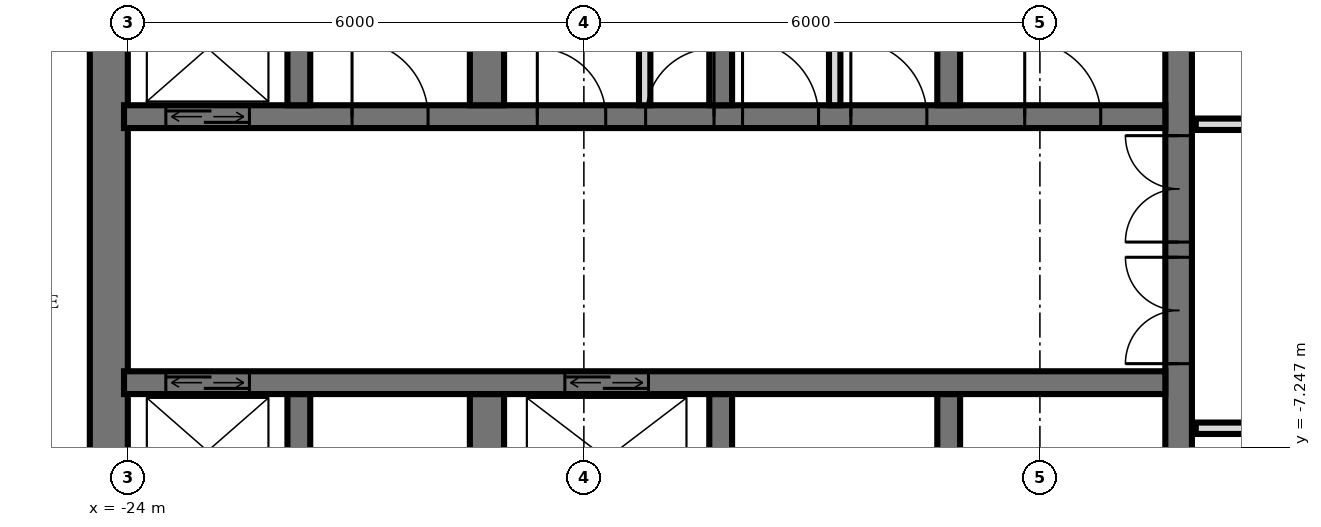
"""IFC4 building model, lengths in metres.
Left out: names, types, materials, properties, quantities, classifications, styles, units other than length and angle.
Written with IfcOpenShell. Run it as: python <this file> out.ifc"""

import sys

from ifc_helpers import new_model, si_unit, direction, frame, frame_2d, origin, place, context, subcontext, project, spatial, rectangle, extrude, element, fill, save


model = new_model("IFC4")
c1 = context("Model", 3, precision=1e-05, world=origin(), true_north=direction((0.0, 1.0)))
c2 = subcontext(c1, "Body", "Model", "MODEL_VIEW")
j1 = project(units=[si_unit("LENGTHUNIT", "METRE"), si_unit("PLANEANGLEUNIT", "RADIAN")], contexts=[c1])
p1 = place(None, origin())
s1 = spatial("IfcSite", under=j1, at=p1, CompositionType="ELEMENT")
p2 = place(p1, origin())
s2 = spatial("IfcBuilding", under=s1, at=p2, CompositionType="ELEMENT")
p3 = place(p2, frame((0.0, 0.0, 127.2)))
s3 = spatial("IfcBuildingStorey", under=s2, at=p3, CompositionType="ELEMENT", Elevation=127.2)
p4 = place(p3, frame((-10.175, -14.55, 0.0), z_axis=(0.0, 0.0, 1.0), x_axis=(0.0, 1.0, 0.0)))
e1 = element("IfcWall", 1, at=p4, inside=s3, PredefinedType="SHEAR", context=c2, shape_type="SweptSolid", body=[
    extrude(rectangle(XDim=14.1, YDim=0.35, at=frame_2d((7.05, 0.0))), origin(), (0.0, 0.0, 1.0), 3.6),
])
p5 = place(p4, frame((8.4, 0.0, 0.0)))
e2 = element("IfcOpeningElement", 2, at=p5, cuts=e1, PredefinedType="OPENING", context=c2, shape_type="SweptSolid", body=[
    extrude(rectangle(XDim=1.4, YDim=2.4, at=frame_2d((0.7, 1.2))), frame((0.0, 0.185, 0.0), z_axis=(0.0, -1.0, 0.0), x_axis=(1.0, 0.0, 0.0)), (0.0, 0.0, 1.0), 0.37),
])
p6 = place(p4, frame((10.0, 0.0, 0.0)))
e3 = element("IfcOpeningElement", 3, at=p6, cuts=e1, PredefinedType="OPENING", context=c2, shape_type="SweptSolid", body=[
    extrude(rectangle(XDim=1.4, YDim=2.4, at=frame_2d((0.7, 1.2))), frame((0.0, 0.185, 0.0), z_axis=(0.0, -1.0, 0.0), x_axis=(1.0, 0.0, 0.0)), (0.0, 0.0, 1.0), 0.37),
])
p7 = place(p4, frame((4.0, 0.0, 0.0)))
e4 = element("IfcOpeningElement", 4, at=p7, cuts=e1, PredefinedType="OPENING", context=c2, shape_type="SweptSolid", body=[
    extrude(rectangle(XDim=1.2, YDim=2.1, at=frame_2d((0.6, 1.05))), frame((0.0, 0.185, 0.0), z_axis=(0.0, -1.0, 0.0), x_axis=(1.0, 0.0, 0.0)), (0.0, 0.0, 1.0), 0.37),
])
p8 = place(p3, frame((-24.25, -14.55, 0.0), z_axis=(0.0, 0.0, 1.0), x_axis=(0.0, 1.0, 0.0)))
e5 = element("IfcWall", 5, at=p8, inside=s3, PredefinedType="SHEAR", context=c2, shape_type="SweptSolid", body=[
    extrude(rectangle(XDim=14.1, YDim=0.5, at=frame_2d((7.05, 0.0))), origin(), (0.0, 0.0, 1.0), 3.6),
])
p9 = place(p3, frame((-24.05, -2.9, 0.0), z_axis=(0.0, 0.0, 1.0), x_axis=(1.0, 0.0, 0.0)))
e6 = element("IfcWall", 6, at=p9, inside=s3, PredefinedType="SHEAR", context=c2, shape_type="SweptSolid", body=[
    extrude(rectangle(XDim=13.7, YDim=0.3, at=frame_2d((6.85, 0.0))), origin(), (0.0, 0.0, 1.0), 3.6),
])
p10 = place(p9, frame((0.55, 0.0, 0.0)))
e7 = element("IfcOpeningElement", 7, at=p10, cuts=e6, PredefinedType="OPENING", context=c2, shape_type="SweptSolid", body=[
    extrude(rectangle(XDim=1.1, YDim=2.1, at=frame_2d((0.55, 1.05))), frame((0.0, 0.16, 0.0), z_axis=(0.0, -1.0, 0.0), x_axis=(1.0, 0.0, 0.0)), (0.0, 0.0, 1.0), 0.32),
])
p11 = place(p9, frame((6.863, 0.0, 0.0)))
e8 = element("IfcOpeningElement", 8, at=p11, cuts=e6, PredefinedType="OPENING", context=c2, shape_type="SweptSolid", body=[
    extrude(rectangle(XDim=0.9, YDim=2.1, at=frame_2d((0.45, 1.05))), frame((0.0, 0.16, 0.0), z_axis=(0.0, -1.0, 0.0), x_axis=(1.0, 0.0, 0.0)), (0.0, 0.0, 1.0), 0.32),
])
p12 = place(p9, frame((5.438, 0.0, 0.0)))
e9 = element("IfcOpeningElement", 9, at=p12, cuts=e6, PredefinedType="OPENING", context=c2, shape_type="SweptSolid", body=[
    extrude(rectangle(XDim=0.9, YDim=2.1, at=frame_2d((0.45, 1.05))), frame((0.0, 0.16, 0.0), z_axis=(0.0, -1.0, 0.0), x_axis=(1.0, 0.0, 0.0)), (0.0, 0.0, 1.0), 0.32),
])
p13 = place(p9, frame((11.85, 0.0, 0.0)))
e10 = element("IfcOpeningElement", 10, at=p13, cuts=e6, PredefinedType="OPENING", context=c2, shape_type="SweptSolid", body=[
    extrude(rectangle(XDim=1.0, YDim=2.1, at=frame_2d((0.5, 1.05))), frame((0.0, 0.16, 0.0), z_axis=(0.0, -1.0, 0.0), x_axis=(1.0, 0.0, 0.0)), (0.0, 0.0, 1.0), 0.32),
])
p14 = place(p9, frame((9.562, 0.0, 0.0)))
e11 = element("IfcOpeningElement", 11, at=p14, cuts=e6, PredefinedType="OPENING", context=c2, shape_type="SweptSolid", body=[
    extrude(rectangle(XDim=1.0, YDim=2.1, at=frame_2d((0.5, 1.05))), frame((0.0, 0.16, 0.0), z_axis=(0.0, -1.0, 0.0), x_axis=(1.0, 0.0, 0.0)), (0.0, 0.0, 1.0), 0.32),
])
p15 = place(p9, frame((8.137, 0.0, 0.0)))
e12 = element("IfcOpeningElement", 12, at=p15, cuts=e6, PredefinedType="OPENING", context=c2, shape_type="SweptSolid", body=[
    extrude(rectangle(XDim=1.0, YDim=2.1, at=frame_2d((0.5, 1.05))), frame((0.0, 0.16, 0.0), z_axis=(0.0, -1.0, 0.0), x_axis=(1.0, 0.0, 0.0)), (0.0, 0.0, 1.0), 0.32),
])
p16 = place(p9, frame((3.0, 0.0, 0.0)))
e13 = element("IfcOpeningElement", 13, at=p16, cuts=e6, PredefinedType="OPENING", context=c2, shape_type="SweptSolid", body=[
    extrude(rectangle(XDim=1.0, YDim=2.1, at=frame_2d((0.5, 1.05))), frame((0.0, 0.16, 0.0), z_axis=(0.0, -1.0, 0.0), x_axis=(1.0, 0.0, 0.0)), (0.0, 0.0, 1.0), 0.32),
])
p17 = place(p3, frame((-24.05, -6.4, 0.0), z_axis=(0.0, 0.0, 1.0), x_axis=(1.0, 0.0, 0.0)))
e14 = element("IfcWall", 14, at=p17, inside=s3, PredefinedType="SHEAR", context=c2, shape_type="SweptSolid", body=[
    extrude(rectangle(XDim=13.7, YDim=0.3, at=frame_2d((6.85, 0.0))), origin(), (0.0, 0.0, 1.0), 3.6),
])
p18 = place(p17, frame((0.55, 0.0, 0.0)))
e15 = element("IfcOpeningElement", 15, at=p18, cuts=e14, PredefinedType="OPENING", context=c2, shape_type="SweptSolid", body=[
    extrude(rectangle(XDim=1.1, YDim=2.1, at=frame_2d((0.55, 1.05))), frame((0.0, 0.16, 0.0), z_axis=(0.0, -1.0, 0.0), x_axis=(1.0, 0.0, 0.0)), (0.0, 0.0, 1.0), 0.32),
])
p19 = place(p17, frame((5.8, 0.0, 0.0)))
e16 = element("IfcOpeningElement", 16, at=p19, cuts=e14, PredefinedType="OPENING", context=c2, shape_type="SweptSolid", body=[
    extrude(rectangle(XDim=1.1, YDim=2.1, at=frame_2d((0.55, 1.05))), frame((0.0, 0.16, 0.0), z_axis=(0.0, -1.0, 0.0), x_axis=(1.0, 0.0, 0.0)), (0.0, 0.0, 1.0), 0.32),
])
for number, where, z_axis, x_axis in (
    (17, (-13.2, -2.75, 0.0), (0.0, 0.0, 1.0), (0.0, 1.0, 0.0)),
    (18, (-13.2, -8.85, 0.0), (0.0, 0.0, 1.0), (0.0, 1.0, 0.0)),
    (19, (-16.2, -2.75, 0.0), (0.0, 0.0, 1.0), (0.0, 1.0, 0.0)),
    (20, (-16.2, -8.85, 0.0), (0.0, 0.0, 1.0), (0.0, 1.0, 0.0)),
):
    element("IfcWall", number, at=place(p3, frame(where, z_axis=z_axis, x_axis=x_axis)), inside=s3, PredefinedType="SHEAR", context=c2, shape_type="SweptSolid", body=[
        extrude(rectangle(XDim=2.3, YDim=0.3, at=frame_2d((1.15, 0.0))), origin(), (0.0, 0.0, 1.0), 3.6),
    ])
for number, where, z_axis, x_axis in (
    (21, (-19.275, -2.75, 0.0), (0.0, 0.0, 1.0), (0.0, 1.0, 0.0)),
    (22, (-19.275, -8.85, 0.0), (0.0, 0.0, 1.0), (0.0, 1.0, 0.0)),
):
    element("IfcWall", number, at=place(p3, frame(where, z_axis=z_axis, x_axis=x_axis)), inside=s3, PredefinedType="SHEAR", context=c2, shape_type="SweptSolid", body=[
        extrude(rectangle(XDim=2.3, YDim=0.45, at=frame_2d((1.15, 0.0))), origin(), (0.0, 0.0, 1.0), 3.6),
    ])
for number, where, z_axis, x_axis in (
    (23, (-21.75, -2.75, 0.0), (0.0, 0.0, 1.0), (0.0, 1.0, 0.0)),
    (24, (-21.75, -8.85, 0.0), (0.0, 0.0, 1.0), (0.0, 1.0, 0.0)),
):
    element("IfcWall", number, at=place(p3, frame(where, z_axis=z_axis, x_axis=x_axis)), inside=s3, PredefinedType="SHEAR", context=c2, shape_type="SweptSolid", body=[
        extrude(rectangle(XDim=2.3, YDim=0.3, at=frame_2d((1.15, 0.0))), origin(), (0.0, 0.0, 1.0), 3.6),
    ])
for number, where, z_axis, x_axis in (
    (25, (-17.2, -2.75, 0.0), (0.0, 0.0, 1.0), (0.0, 1.0, 0.0)),
    (26, (-14.7, -2.75, 0.0), (0.0, 0.0, 1.0), (0.0, 1.0, 0.0)),
):
    element("IfcWall", number, at=place(p3, frame(where, z_axis=z_axis, x_axis=x_axis)), inside=s3, PredefinedType="PARTITIONING", context=c2, shape_type="SweptSolid", body=[
        extrude(rectangle(XDim=2.3, YDim=0.15, at=frame_2d((1.15, 0.0))), origin(), (0.0, 0.0, 1.0), 3.3),
    ])
p20 = place(p3, frame((-9.95, -7.0, 0.0), z_axis=(0.0, 0.0, 1.0), x_axis=(1.0, 0.0, 0.0)))
e27 = element("IfcWall", 27, at=p20, inside=s3, PredefinedType="PARTITIONING", context=c2, shape_type="SweptSolid", body=[
    extrude(rectangle(XDim=19.9, YDim=0.15, at=frame_2d((9.95, 0.0))), origin(), (0.0, 0.0, 1.0), 3.32),
])
p21 = place(p20, frame((9.45, 0.0, 0.0)))
e28 = element("IfcOpeningElement", 28, at=p21, cuts=e27, PredefinedType="OPENING", context=c2, shape_type="SweptSolid", body=[
    extrude(rectangle(XDim=1.0, YDim=2.1, at=frame_2d((0.5, 1.05))), frame((0.0, 0.085, 0.0), z_axis=(0.0, -1.0, 0.0), x_axis=(1.0, 0.0, 0.0)), (0.0, 0.0, 1.0), 0.17),
])
p22 = place(p20, frame((15.45, 0.0, 0.0)))
e29 = element("IfcOpeningElement", 29, at=p22, cuts=e27, PredefinedType="OPENING", context=c2, shape_type="SweptSolid", body=[
    extrude(rectangle(XDim=1.0, YDim=2.1, at=frame_2d((0.5, 1.05))), frame((0.0, 0.085, 0.0), z_axis=(0.0, -1.0, 0.0), x_axis=(1.0, 0.0, 0.0)), (0.0, 0.0, 1.0), 0.17),
])
p23 = place(p3, frame((-9.95, -3.0, 0.0), z_axis=(0.0, 0.0, 1.0), x_axis=(1.0, 0.0, 0.0)))
e30 = element("IfcWall", 30, at=p23, inside=s3, PredefinedType="PARTITIONING", context=c2, shape_type="SweptSolid", body=[
    extrude(rectangle(XDim=19.9, YDim=0.15, at=frame_2d((9.95, 0.0))), origin(), (0.0, 0.0, 1.0), 3.32),
])
p24 = place(p23, frame((1.7, 0.0, 0.0)))
e31 = element("IfcOpeningElement", 31, at=p24, cuts=e30, PredefinedType="OPENING", context=c2, shape_type="SweptSolid", body=[
    extrude(rectangle(XDim=1.0, YDim=2.1, at=frame_2d((0.5, 1.05))), frame((0.0, 0.085, 0.0), z_axis=(0.0, -1.0, 0.0), x_axis=(1.0, 0.0, 0.0)), (0.0, 0.0, 1.0), 0.17),
])
p25 = place(p23, frame((5.45, 0.0, 0.0)))
e32 = element("IfcOpeningElement", 32, at=p25, cuts=e30, PredefinedType="OPENING", context=c2, shape_type="SweptSolid", body=[
    extrude(rectangle(XDim=1.0, YDim=2.1, at=frame_2d((0.5, 1.05))), frame((0.0, 0.085, 0.0), z_axis=(0.0, -1.0, 0.0), x_axis=(1.0, 0.0, 0.0)), (0.0, 0.0, 1.0), 0.17),
])
p26 = place(p23, frame((8.2, 0.0, 0.0)))
e33 = element("IfcOpeningElement", 33, at=p26, cuts=e30, PredefinedType="OPENING", context=c2, shape_type="SweptSolid", body=[
    extrude(rectangle(XDim=1.0, YDim=2.1, at=frame_2d((0.5, 1.05))), frame((0.0, 0.085, 0.0), z_axis=(0.0, -1.0, 0.0), x_axis=(1.0, 0.0, 0.0)), (0.0, 0.0, 1.0), 0.17),
])
p27 = place(p23, frame((11.95, 0.0, 0.0)))
e34 = element("IfcOpeningElement", 34, at=p27, cuts=e30, PredefinedType="OPENING", context=c2, shape_type="SweptSolid", body=[
    extrude(rectangle(XDim=1.0, YDim=2.1, at=frame_2d((0.5, 1.05))), frame((0.0, 0.085, 0.0), z_axis=(0.0, -1.0, 0.0), x_axis=(1.0, 0.0, 0.0)), (0.0, 0.0, 1.0), 0.17),
])
p28 = place(p23, frame((16.95, 0.0, 0.0)))
e35 = element("IfcOpeningElement", 35, at=p28, cuts=e30, PredefinedType="OPENING", context=c2, shape_type="SweptSolid", body=[
    extrude(rectangle(XDim=1.0, YDim=2.1, at=frame_2d((0.5, 1.05))), frame((0.0, 0.085, 0.0), z_axis=(0.0, -1.0, 0.0), x_axis=(1.0, 0.0, 0.0)), (0.0, 0.0, 1.0), 0.17),
])
p29 = place(p10, origin())
e36 = element("IfcDoor", 36, at=p29, inside=s3, OperationType="DOUBLE_DOOR_SLIDING", PredefinedType="USERDEFINED", context=c2, shape_type="SweptSolid", body=[
    extrude(rectangle(XDim=1.1, YDim=2.1, at=frame_2d((0.55, 1.05))), frame((0.0, 0.025, 0.0), z_axis=(0.0, -1.0, 0.0), x_axis=(1.0, 0.0, 0.0)), (0.0, 0.0, 1.0), 0.05),
])
fill(e7, e36)
p30 = place(p18, origin())
e37 = element("IfcDoor", 37, at=p30, inside=s3, OperationType="DOUBLE_DOOR_SLIDING", PredefinedType="USERDEFINED", context=c2, shape_type="SweptSolid", body=[
    extrude(rectangle(XDim=1.1, YDim=2.1, at=frame_2d((0.55, 1.05))), frame((0.0, 0.025, 0.0), z_axis=(0.0, -1.0, 0.0), x_axis=(1.0, 0.0, 0.0)), (0.0, 0.0, 1.0), 0.05),
])
fill(e15, e37)
p31 = place(p19, origin())
e38 = element("IfcDoor", 38, at=p31, inside=s3, OperationType="DOUBLE_DOOR_SLIDING", PredefinedType="USERDEFINED", context=c2, shape_type="SweptSolid", body=[
    extrude(rectangle(XDim=1.1, YDim=2.1, at=frame_2d((0.55, 1.05))), frame((0.0, 0.025, 0.0), z_axis=(0.0, -1.0, 0.0), x_axis=(1.0, 0.0, 0.0)), (0.0, 0.0, 1.0), 0.05),
])
fill(e16, e38)
p32 = place(p5, origin())
e39 = element("IfcDoor", 39, at=p32, inside=s3, OperationType="DOUBLE_DOOR_SINGLE_SWING", PredefinedType="DOOR", context=c2, shape_type="SweptSolid", body=[
    extrude(rectangle(XDim=1.4, YDim=2.4, at=frame_2d((0.7, 1.2))), frame((0.0, 0.025, 0.0), z_axis=(0.0, -1.0, 0.0), x_axis=(1.0, 0.0, 0.0)), (0.0, 0.0, 1.0), 0.05),
])
fill(e2, e39)
p33 = place(p6, origin())
e40 = element("IfcDoor", 40, at=p33, inside=s3, OperationType="DOUBLE_DOOR_SINGLE_SWING", PredefinedType="DOOR", context=c2, shape_type="SweptSolid", body=[
    extrude(rectangle(XDim=1.4, YDim=2.4, at=frame_2d((0.7, 1.2))), frame((0.0, 0.025, 0.0), z_axis=(0.0, -1.0, 0.0), x_axis=(1.0, 0.0, 0.0)), (0.0, 0.0, 1.0), 0.05),
])
fill(e3, e40)
p34 = place(p11, origin())
e41 = element("IfcDoor", 41, at=p34, inside=s3, OperationType="SINGLE_SWING_LEFT", PredefinedType="DOOR", context=c2, shape_type="SweptSolid", body=[
    extrude(rectangle(XDim=0.9, YDim=2.1, at=frame_2d((0.45, 1.05))), frame((0.0, 0.025, 0.0), z_axis=(0.0, -1.0, 0.0), x_axis=(1.0, 0.0, 0.0)), (0.0, 0.0, 1.0), 0.05),
])
fill(e8, e41)
p35 = place(p12, origin())
e42 = element("IfcDoor", 42, at=p35, inside=s3, OperationType="SINGLE_SWING_RIGHT", PredefinedType="DOOR", context=c2, shape_type="SweptSolid", body=[
    extrude(rectangle(XDim=0.9, YDim=2.1, at=frame_2d((0.45, 1.05))), frame((0.0, 0.025, 0.0), z_axis=(0.0, -1.0, 0.0), x_axis=(1.0, 0.0, 0.0)), (0.0, 0.0, 1.0), 0.05),
])
fill(e9, e42)
p36 = place(p13, origin())
e43 = element("IfcDoor", 43, at=p36, inside=s3, OperationType="SINGLE_SWING_RIGHT", PredefinedType="DOOR", context=c2, shape_type="SweptSolid", body=[
    extrude(rectangle(XDim=1.0, YDim=2.1, at=frame_2d((0.5, 1.05))), frame((0.0, 0.025, 0.0), z_axis=(0.0, -1.0, 0.0), x_axis=(1.0, 0.0, 0.0)), (0.0, 0.0, 1.0), 0.05),
])
fill(e10, e43)
p37 = place(p14, origin())
e44 = element("IfcDoor", 44, at=p37, inside=s3, OperationType="SINGLE_SWING_RIGHT", PredefinedType="DOOR", context=c2, shape_type="SweptSolid", body=[
    extrude(rectangle(XDim=1.0, YDim=2.1, at=frame_2d((0.5, 1.05))), frame((0.0, 0.025, 0.0), z_axis=(0.0, -1.0, 0.0), x_axis=(1.0, 0.0, 0.0)), (0.0, 0.0, 1.0), 0.05),
])
fill(e11, e44)
p38 = place(p15, origin())
e45 = element("IfcDoor", 45, at=p38, inside=s3, OperationType="SINGLE_SWING_RIGHT", PredefinedType="DOOR", context=c2, shape_type="SweptSolid", body=[
    extrude(rectangle(XDim=1.0, YDim=2.1, at=frame_2d((0.5, 1.05))), frame((0.0, 0.025, 0.0), z_axis=(0.0, -1.0, 0.0), x_axis=(1.0, 0.0, 0.0)), (0.0, 0.0, 1.0), 0.05),
])
fill(e12, e45)
p39 = place(p16, origin())
e46 = element("IfcDoor", 46, at=p39, inside=s3, OperationType="SINGLE_SWING_RIGHT", PredefinedType="DOOR", context=c2, shape_type="SweptSolid", body=[
    extrude(rectangle(XDim=1.0, YDim=2.1, at=frame_2d((0.5, 1.05))), frame((0.0, 0.025, 0.0), z_axis=(0.0, -1.0, 0.0), x_axis=(1.0, 0.0, 0.0)), (0.0, 0.0, 1.0), 0.05),
])
fill(e13, e46)
save(model, sys.argv[1])
